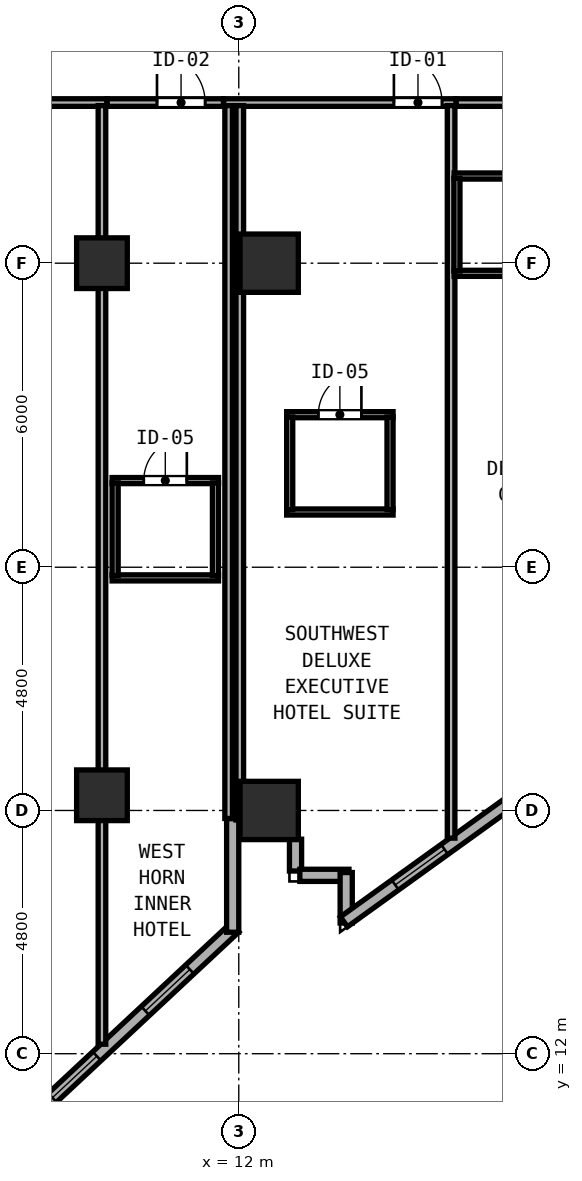
"""IFC4 building model, lengths in metres.
Left out: names, types, materials, properties, quantities, classifications, styles, units other than length and angle.
Written with IfcOpenShell. Run it as: python <this file> out.ifc"""

import sys

from ifc_helpers import new_model, si_unit, direction, frame, frame_2d, origin, origin_2d, place, context, subcontext, project, spatial, rectangle, hollow_rectangle, extrude, element, fill, save


model = new_model("IFC4")
c1 = context("Model", 3, precision=1e-05, world=origin(), true_north=direction((0.0, 1.0)))
c2 = subcontext(c1, "Body", "Model", "MODEL_VIEW")
j1 = project(units=[si_unit("LENGTHUNIT", "METRE"), si_unit("PLANEANGLEUNIT", "RADIAN")], contexts=[c1])
p1 = place(None, origin())
s1 = spatial("IfcSite", under=j1, at=p1, CompositionType="ELEMENT")
p2 = place(p1, origin())
s2 = spatial("IfcBuilding", under=s1, at=p2, CompositionType="ELEMENT")
p3 = place(p2, frame((0.0, 0.0, 85.6)))
s3 = spatial("IfcBuildingStorey", under=s2, at=p3, CompositionType="ELEMENT", Elevation=85.6)
for number, where, z_axis, x_axis in (
    (1, (12.6, 16.8, 0.0), (0.0, 0.0, 1.0), (1.0, 0.0, 0.0)),
    (2, (12.6, 27.6, 0.0), (0.0, 0.0, 1.0), (1.0, 0.0, 0.0)),
):
    element("IfcColumn", number, at=place(p3, frame(where, z_axis=z_axis, x_axis=x_axis)), inside=s3, PredefinedType="COLUMN", context=c2, shape_type="SweptSolid", body=[
        extrude(hollow_rectangle(XDim=1.15, YDim=1.15, WallThickness=0.042, at=origin_2d()), origin(), (0.0, 0.0, 1.0), 3.8),
    ])
for number, where, z_axis, x_axis in (
    (3, (9.3, 17.1, 0.0), (0.0, 0.0, 1.0), (1.0, 0.0, 0.0)),
    (4, (9.3, 27.6, 0.0), (0.0, 0.0, 1.0), (1.0, 0.0, 0.0)),
):
    element("IfcColumn", number, at=place(p3, frame(where, z_axis=z_axis, x_axis=x_axis)), inside=s3, PredefinedType="COLUMN", context=c2, shape_type="SweptSolid", body=[
        extrude(hollow_rectangle(XDim=1.0, YDim=1.0, WallThickness=0.038, at=origin_2d()), origin(), (0.0, 0.0, 1.0), 3.8),
    ])
p4 = place(p3, frame((3.27, 6.416, 0.0), z_axis=(0.0, 0.0, 1.0), x_axis=(0.731064187858, 0.682308693505, 0.0)))
e5 = element("IfcWall", 5, at=p4, inside=s3, PredefinedType="SOLIDWALL", context=c2, shape_type="SweptSolid", body=[
    extrude(rectangle(XDim=11.833, YDim=0.24, at=frame_2d((5.916, 0.0))), origin(), (0.0, 0.0, 1.0), 3.54),
])
p5 = place(p4, frame((1.6, 0.0, 0.85)))
e6 = element("IfcOpeningElement", 6, at=p5, cuts=e5, PredefinedType="OPENING", context=c2, shape_type="SweptSolid", body=[
    extrude(rectangle(XDim=1.2, YDim=1.85, at=frame_2d((0.6, 0.925))), frame((0.0, 0.13, 0.0), z_axis=(0.0, -1.0, 0.0), x_axis=(1.0, 0.0, 0.0)), (0.0, 0.0, 1.0), 0.26),
])
p6 = place(p4, frame((6.912, 0.0, 0.85)))
e7 = element("IfcOpeningElement", 7, at=p6, cuts=e5, PredefinedType="OPENING", context=c2, shape_type="SweptSolid", body=[
    extrude(rectangle(XDim=1.2, YDim=1.85, at=frame_2d((0.6, 0.925))), frame((0.0, 0.13, 0.0), z_axis=(0.0, -1.0, 0.0), x_axis=(1.0, 0.0, 0.0)), (0.0, 0.0, 1.0), 0.26),
])
p7 = place(p4, frame((9.421, 0.0, 0.85)))
e8 = element("IfcOpeningElement", 8, at=p7, cuts=e5, PredefinedType="OPENING", context=c2, shape_type="SweptSolid", body=[
    extrude(rectangle(XDim=1.2, YDim=1.85, at=frame_2d((0.6, 0.925))), frame((0.0, 0.13, 0.0), z_axis=(0.0, -1.0, 0.0), x_axis=(1.0, 0.0, 0.0)), (0.0, 0.0, 1.0), 0.26),
])
p8 = place(p3, frame((11.88, 14.397, 0.0), z_axis=(0.0, 0.0, 1.0), x_axis=(0.0, 1.0, 0.0)))
e9 = element("IfcWall", 9, at=p8, inside=s3, PredefinedType="SOLIDWALL", context=c2, shape_type="SweptSolid", body=[
    extrude(rectangle(XDim=2.243, YDim=0.24, at=frame_2d((1.121, 0.0))), origin(), (0.0, 0.0, 1.0), 3.54),
])
p9 = place(p3, frame((13.12, 16.233, 0.0), z_axis=(0.0, 0.0, 1.0), x_axis=(0.0, -1.0, 0.0)))
e10 = element("IfcWall", 10, at=p9, inside=s3, PredefinedType="SOLIDWALL", context=c2, shape_type="SweptSolid", body=[
    extrude(rectangle(XDim=0.628, YDim=0.24, at=frame_2d((0.314, 0.0))), origin(), (0.0, 0.0, 1.0), 3.54),
])
p10 = place(p3, frame((13.205, 15.52, 0.0), z_axis=(0.0, 0.0, 1.0), x_axis=(1.0, 0.0, 0.0)))
e11 = element("IfcWall", 11, at=p10, inside=s3, PredefinedType="SOLIDWALL", context=c2, shape_type="SweptSolid", body=[
    extrude(rectangle(XDim=0.97, YDim=0.24, at=frame_2d((0.485, 0.0))), origin(), (0.0, 0.0, 1.0), 3.54),
])
p11 = place(p3, frame((14.12, 15.575, 0.0), z_axis=(0.0, 0.0, 1.0), x_axis=(0.0, -1.0, 0.0)))
e12 = element("IfcWall", 12, at=p11, inside=s3, PredefinedType="SOLIDWALL", context=c2, shape_type="SweptSolid", body=[
    extrude(rectangle(XDim=0.996, YDim=0.24, at=frame_2d((0.498, 0.0))), origin(), (0.0, 0.0, 1.0), 3.54),
])
p12 = place(p3, frame((14.075, 14.602, 0.0), z_axis=(0.0, 0.0, 1.0), x_axis=(0.811543176492, 0.58429245476, 0.0)))
e13 = element("IfcWall", 13, at=p12, inside=s3, PredefinedType="SOLIDWALL", context=c2, shape_type="SweptSolid", body=[
    extrude(rectangle(XDim=11.531, YDim=0.24, at=frame_2d((5.765, 0.0))), origin(), (0.0, 0.0, 1.0), 3.037),
])
p13 = place(p12, frame((1.246, 0.0, 0.85)))
e14 = element("IfcOpeningElement", 14, at=p13, cuts=e13, PredefinedType="OPENING", context=c2, shape_type="SweptSolid", body=[
    extrude(rectangle(XDim=1.2, YDim=1.85, at=frame_2d((0.6, 0.925))), frame((0.0, 0.13, 0.0), z_axis=(0.0, -1.0, 0.0), x_axis=(1.0, 0.0, 0.0)), (0.0, 0.0, 1.0), 0.26),
])
p14 = place(p12, frame((6.36, 0.0, 0.85)))
e15 = element("IfcOpeningElement", 15, at=p14, cuts=e13, PredefinedType="OPENING", context=c2, shape_type="SweptSolid", body=[
    extrude(rectangle(XDim=1.2, YDim=1.85, at=frame_2d((0.6, 0.925))), frame((0.0, 0.13, 0.0), z_axis=(0.0, -1.0, 0.0), x_axis=(1.0, 0.0, 0.0)), (0.0, 0.0, 1.0), 0.26),
])
p15 = place(p12, frame((9.07, 0.0, 0.85)))
e16 = element("IfcOpeningElement", 16, at=p15, cuts=e13, PredefinedType="OPENING", context=c2, shape_type="SweptSolid", body=[
    extrude(rectangle(XDim=1.2, YDim=1.85, at=frame_2d((0.6, 0.925))), frame((0.0, 0.13, 0.0), z_axis=(0.0, -1.0, 0.0), x_axis=(1.0, 0.0, 0.0)), (0.0, 0.0, 1.0), 0.26),
])
p16 = place(p3, frame((12.173, 33.524, 0.0), z_axis=(0.0, 0.0, 1.0), x_axis=(-0.963197271032, -0.268795493036, 0.0)))
e17 = element("IfcWall", 17, at=p16, inside=s3, PredefinedType="SOLIDWALL", context=c2, shape_type="SweptSolid", body=[
    extrude(rectangle(XDim=9.095, YDim=0.24, at=frame_2d((4.548, 0.0))), origin(), (0.0, 0.0, 1.0), 3.54),
])
p17 = place(p16, frame((1.6, 0.0, 0.85)))
e18 = element("IfcOpeningElement", 18, at=p17, cuts=e17, PredefinedType="OPENING", context=c2, shape_type="SweptSolid", body=[
    extrude(rectangle(XDim=1.2, YDim=1.85, at=frame_2d((0.6, 0.925))), frame((0.0, 0.13, 0.0), z_axis=(0.0, -1.0, 0.0), x_axis=(1.0, 0.0, 0.0)), (0.0, 0.0, 1.0), 0.26),
])
p18 = place(p16, frame((7.0, 0.0, 0.85)))
e19 = element("IfcOpeningElement", 19, at=p18, cuts=e17, PredefinedType="OPENING", context=c2, shape_type="SweptSolid", body=[
    extrude(rectangle(XDim=1.2, YDim=1.85, at=frame_2d((0.6, 0.925))), frame((0.0, 0.13, 0.0), z_axis=(0.0, -1.0, 0.0), x_axis=(1.0, 0.0, 0.0)), (0.0, 0.0, 1.0), 0.26),
])
p19 = place(p3, frame((11.7, 30.77, 0.0), z_axis=(0.0, 0.0, 1.0), x_axis=(1.0, 0.0, 0.0)))
e20 = element("IfcWall", 20, at=p19, inside=s3, PredefinedType="PARTITIONING", context=c2, shape_type="SweptSolid", body=[
    extrude(rectangle(XDim=4.59, YDim=0.15, at=frame_2d((2.295, 0.0))), origin(), (0.0, 0.0, 1.0), 3.54),
])
p20 = place(p19, frame((4.311, 0.0, 0.0), z_axis=(0.0, 0.0, 1.0), x_axis=(-1.0, 0.0, 0.0)))
e21 = element("IfcOpeningElement", 21, at=p20, cuts=e20, PredefinedType="OPENING", context=c2, shape_type="SweptSolid", body=[
    extrude(rectangle(XDim=0.95, YDim=2.18, at=frame_2d((0.475, 1.09))), frame((0.0, 0.085, 0.0), z_axis=(0.0, -1.0, 0.0), x_axis=(1.0, 0.0, 0.0)), (0.0, 0.0, 1.0), 0.17),
])
p21 = place(p3, frame((11.8, 16.642, 0.0), z_axis=(0.0, 0.0, 1.0), x_axis=(0.0, 1.0, 0.0)))
e22 = element("IfcWall", 22, at=p21, inside=s3, PredefinedType="PARTITIONING", context=c2, shape_type="SweptSolid", body=[
    extrude(rectangle(XDim=14.068, YDim=0.15, at=frame_2d((7.034, 0.0))), origin(), (0.0, 0.0, 1.0), 3.54),
])
p22 = place(p3, frame((16.19, 16.254, 0.0), z_axis=(0.0, 0.0, 1.0), x_axis=(0.0, 1.0, 0.0)))
e23 = element("IfcWall", 23, at=p22, inside=s3, PredefinedType="PARTITIONING", context=c2, shape_type="SweptSolid", body=[
    extrude(rectangle(XDim=14.456, YDim=0.15, at=frame_2d((7.228, 0.0))), origin(), (0.0, 0.0, 1.0), 3.54),
])
p23 = place(p3, frame((12.945, 24.61, 0.0), z_axis=(0.0, 0.0, 1.0), x_axis=(1.0, 0.0, 0.0)))
e24 = element("IfcWall", 24, at=p23, inside=s3, PredefinedType="PARTITIONING", context=c2, shape_type="SweptSolid", body=[
    extrude(rectangle(XDim=2.1, YDim=0.12, at=frame_2d((1.05, 0.0))), origin(), (0.0, 0.0, 1.0), 3.54),
])
p24 = place(p23, frame((1.475, 0.0, 0.0), z_axis=(0.0, 0.0, 1.0), x_axis=(-1.0, 0.0, 0.0)))
e25 = element("IfcOpeningElement", 25, at=p24, cuts=e24, PredefinedType="OPENING", context=c2, shape_type="SweptSolid", body=[
    extrude(rectangle(XDim=0.85, YDim=2.1, at=frame_2d((0.425, 1.05))), frame((0.0, 0.07, 0.0), z_axis=(0.0, -1.0, 0.0), x_axis=(1.0, 0.0, 0.0)), (0.0, 0.0, 1.0), 0.14),
])
p25 = place(p3, frame((12.945, 22.69, 0.0), z_axis=(0.0, 0.0, 1.0), x_axis=(1.0, 0.0, 0.0)))
e26 = element("IfcWall", 26, at=p25, inside=s3, PredefinedType="PARTITIONING", context=c2, shape_type="SweptSolid", body=[
    extrude(rectangle(XDim=2.1, YDim=0.12, at=frame_2d((1.05, 0.0))), origin(), (0.0, 0.0, 1.0), 3.54),
])
for number, where, z_axis, x_axis in (
    (27, (13.005, 22.735, 0.0), (0.0, 0.0, 1.0), (0.0, 1.0, 0.0)),
    (28, (14.985, 22.735, 0.0), (0.0, 0.0, 1.0), (0.0, 1.0, 0.0)),
):
    element("IfcWall", number, at=place(p3, frame(where, z_axis=z_axis, x_axis=x_axis)), inside=s3, PredefinedType="PARTITIONING", context=c2, shape_type="SweptSolid", body=[
        extrude(rectangle(XDim=1.83, YDim=0.12, at=frame_2d((0.915, 0.0))), origin(), (0.0, 0.0, 1.0), 3.54),
    ])
p26 = place(p3, frame((16.292, 30.77, 0.0), z_axis=(0.0, 0.0, 1.0), x_axis=(1.0, 0.0, 0.0)))
e29 = element("IfcWall", 29, at=p26, inside=s3, PredefinedType="PARTITIONING", context=c2, shape_type="SweptSolid", body=[
    extrude(rectangle(XDim=4.148, YDim=0.15, at=frame_2d((2.074, 0.0))), origin(), (0.0, 0.0, 1.0), 3.54),
])
p27 = place(p26, frame((3.885, 0.0, 0.0), z_axis=(0.0, 0.0, 1.0), x_axis=(-1.0, 0.0, 0.0)))
e30 = element("IfcOpeningElement", 30, at=p27, cuts=e29, PredefinedType="OPENING", context=c2, shape_type="SweptSolid", body=[
    extrude(rectangle(XDim=0.95, YDim=2.15, at=frame_2d((0.475, 1.075))), frame((0.0, 0.085, 0.0), z_axis=(0.0, -1.0, 0.0), x_axis=(1.0, 0.0, 0.0)), (0.0, 0.0, 1.0), 0.17),
])
p28 = place(p3, frame((16.25, 29.32, 0.0), z_axis=(0.0, 0.0, 1.0), x_axis=(1.0, 0.0, 0.0)))
e31 = element("IfcWall", 31, at=p28, inside=s3, PredefinedType="PARTITIONING", context=c2, shape_type="SweptSolid", body=[
    extrude(rectangle(XDim=2.095, YDim=0.12, at=frame_2d((1.047, 0.0))), origin(), (0.0, 0.0, 1.0), 3.54),
])
p29 = place(p3, frame((16.25, 27.4, 0.0), z_axis=(0.0, 0.0, 1.0), x_axis=(1.0, 0.0, 0.0)))
e32 = element("IfcWall", 32, at=p29, inside=s3, PredefinedType="PARTITIONING", context=c2, shape_type="SweptSolid", body=[
    extrude(rectangle(XDim=2.095, YDim=0.12, at=frame_2d((1.047, 0.0))), origin(), (0.0, 0.0, 1.0), 3.037),
])
p30 = place(p3, frame((16.305, 27.445, 0.0), z_axis=(0.0, 0.0, 1.0), x_axis=(0.0, 1.0, 0.0)))
e33 = element("IfcWall", 33, at=p30, inside=s3, PredefinedType="PARTITIONING", context=c2, shape_type="SweptSolid", body=[
    extrude(rectangle(XDim=1.83, YDim=0.12, at=frame_2d((0.915, 0.0))), origin(), (0.0, 0.0, 1.0), 3.54),
])
p31 = place(p3, frame((3.311, 30.77, 0.0), z_axis=(0.0, 0.0, 1.0), x_axis=(1.0, 0.0, 0.0)))
e34 = element("IfcWall", 34, at=p31, inside=s3, PredefinedType="PARTITIONING", context=c2, shape_type="SweptSolid", body=[
    extrude(rectangle(XDim=6.089, YDim=0.15, at=frame_2d((3.044, 0.0))), origin(), (0.0, 0.0, 1.0), 3.54),
])
p32 = place(p31, frame((4.801, 0.0, 0.0), z_axis=(0.0, 0.0, 1.0), x_axis=(-1.0, 0.0, 0.0)))
e35 = element("IfcOpeningElement", 35, at=p32, cuts=e34, PredefinedType="OPENING", context=c2, shape_type="SweptSolid", body=[
    extrude(rectangle(XDim=0.95, YDim=2.18, at=frame_2d((0.475, 1.09))), frame((0.0, 0.085, 0.0), z_axis=(0.0, -1.0, 0.0), x_axis=(1.0, 0.0, 0.0)), (0.0, 0.0, 1.0), 0.17),
])
p33 = place(p3, frame((9.3, 12.188, 0.0), z_axis=(0.0, 0.0, 1.0), x_axis=(0.0, 1.0, 0.0)))
e36 = element("IfcWall", 36, at=p33, inside=s3, PredefinedType="PARTITIONING", context=c2, shape_type="SweptSolid", body=[
    extrude(rectangle(XDim=18.522, YDim=0.15, at=frame_2d((9.261, 0.0))), origin(), (0.0, 0.0, 1.0), 3.54),
])
p34 = place(p3, frame((9.402, 30.77, 0.0), z_axis=(0.0, 0.0, 1.0), x_axis=(1.0, 0.0, 0.0)))
e37 = element("IfcWall", 37, at=p34, inside=s3, PredefinedType="PARTITIONING", context=c2, shape_type="SweptSolid", body=[
    extrude(rectangle(XDim=2.296, YDim=0.15, at=frame_2d((1.148, 0.0))), origin(), (0.0, 0.0, 1.0), 3.54),
])
p35 = place(p34, frame((1.934, 0.0, 0.0), z_axis=(0.0, 0.0, 1.0), x_axis=(-1.0, 0.0, 0.0)))
e38 = element("IfcOpeningElement", 38, at=p35, cuts=e37, PredefinedType="OPENING", context=c2, shape_type="SweptSolid", body=[
    extrude(rectangle(XDim=0.95, YDim=2.15, at=frame_2d((0.475, 1.075))), frame((0.0, 0.085, 0.0), z_axis=(0.0, -1.0, 0.0), x_axis=(1.0, 0.0, 0.0)), (0.0, 0.0, 1.0), 0.17),
])
p36 = place(p3, frame((12.02, 16.612, 0.0), z_axis=(0.0, 0.0, 1.0), x_axis=(0.0, 1.0, 0.0)))
e39 = element("IfcWall", 39, at=p36, inside=s3, PredefinedType="PARTITIONING", context=c2, shape_type="SweptSolid", body=[
    extrude(rectangle(XDim=14.098, YDim=0.15, at=frame_2d((7.049, 0.0))), origin(), (0.0, 0.0, 1.0), 3.54),
])
p37 = place(p3, frame((9.5, 23.31, 0.0), z_axis=(0.0, 0.0, 1.0), x_axis=(1.0, 0.0, 0.0)))
e40 = element("IfcWall", 40, at=p37, inside=s3, PredefinedType="PARTITIONING", context=c2, shape_type="SweptSolid", body=[
    extrude(rectangle(XDim=2.1, YDim=0.12, at=frame_2d((1.05, 0.0))), origin(), (0.0, 0.0, 1.0), 3.54),
])
p38 = place(p37, frame((1.475, 0.0, 0.0), z_axis=(0.0, 0.0, 1.0), x_axis=(-1.0, 0.0, 0.0)))
e41 = element("IfcOpeningElement", 41, at=p38, cuts=e40, PredefinedType="OPENING", context=c2, shape_type="SweptSolid", body=[
    extrude(rectangle(XDim=0.85, YDim=2.1, at=frame_2d((0.425, 1.05))), frame((0.0, 0.07, 0.0), z_axis=(0.0, -1.0, 0.0), x_axis=(1.0, 0.0, 0.0)), (0.0, 0.0, 1.0), 0.14),
])
p39 = place(p3, frame((9.5, 21.39, 0.0), z_axis=(0.0, 0.0, 1.0), x_axis=(1.0, 0.0, 0.0)))
e42 = element("IfcWall", 42, at=p39, inside=s3, PredefinedType="PARTITIONING", context=c2, shape_type="SweptSolid", body=[
    extrude(rectangle(XDim=2.1, YDim=0.12, at=frame_2d((1.05, 0.0))), origin(), (0.0, 0.0, 1.0), 3.54),
])
for number, where, z_axis, x_axis in (
    (43, (9.56, 21.435, 0.0), (0.0, 0.0, 1.0), (0.0, 1.0, 0.0)),
    (44, (11.54, 21.435, 0.0), (0.0, 0.0, 1.0), (0.0, 1.0, 0.0)),
):
    element("IfcWall", number, at=place(p3, frame(where, z_axis=z_axis, x_axis=x_axis)), inside=s3, PredefinedType="PARTITIONING", context=c2, shape_type="SweptSolid", body=[
        extrude(rectangle(XDim=1.83, YDim=0.12, at=frame_2d((0.915, 0.0))), origin(), (0.0, 0.0, 1.0), 3.54),
    ])
p40 = place(p6, origin())
e45 = element("IfcWindow", 45, at=p40, inside=s3, PartitioningType="SINGLE_PANEL", PredefinedType="WINDOW", context=c2, shape_type="SweptSolid", body=[
    extrude(rectangle(XDim=1.2, YDim=1.85, at=frame_2d((0.6, 0.925))), frame((0.0, 0.03, 0.0), z_axis=(0.0, -1.0, 0.0), x_axis=(1.0, 0.0, 0.0)), (0.0, 0.0, 1.0), 0.06),
])
fill(e7, e45)
p41 = place(p13, origin())
e46 = element("IfcWindow", 46, at=p41, inside=s3, PartitioningType="SINGLE_PANEL", PredefinedType="WINDOW", context=c2, shape_type="SweptSolid", body=[
    extrude(rectangle(XDim=1.2, YDim=1.85, at=frame_2d((0.6, 0.925))), frame((0.0, 0.03, 0.0), z_axis=(0.0, -1.0, 0.0), x_axis=(1.0, 0.0, 0.0)), (0.0, 0.0, 1.0), 0.06),
])
fill(e14, e46)
p42 = place(p20, origin())
e47 = element("IfcDoor", 47, at=p42, inside=s3, OperationType="SINGLE_SWING_RIGHT", PredefinedType="DOOR", context=c2, shape_type="SweptSolid", body=[
    extrude(rectangle(XDim=0.95, YDim=2.18, at=frame_2d((0.475, 1.09))), frame((0.0, 0.025, 0.0), z_axis=(0.0, -1.0, 0.0), x_axis=(1.0, 0.0, 0.0)), (0.0, 0.0, 1.0), 0.05),
])
fill(e21, e47)
p43 = place(p24, origin())
e48 = element("IfcDoor", 48, at=p43, inside=s3, OperationType="SINGLE_SWING_LEFT", PredefinedType="DOOR", context=c2, shape_type="SweptSolid", body=[
    extrude(rectangle(XDim=0.85, YDim=2.1, at=frame_2d((0.425, 1.05))), frame((0.0, 0.025, 0.0), z_axis=(0.0, -1.0, 0.0), x_axis=(1.0, 0.0, 0.0)), (0.0, 0.0, 1.0), 0.05),
])
fill(e25, e48)
p44 = place(p35, origin())
e49 = element("IfcDoor", 49, at=p44, inside=s3, OperationType="SINGLE_SWING_RIGHT", PredefinedType="DOOR", context=c2, shape_type="SweptSolid", body=[
    extrude(rectangle(XDim=0.95, YDim=2.15, at=frame_2d((0.475, 1.075))), frame((0.0, 0.025, 0.0), z_axis=(0.0, -1.0, 0.0), x_axis=(1.0, 0.0, 0.0)), (0.0, 0.0, 1.0), 0.05),
])
fill(e38, e49)
p45 = place(p38, origin())
e50 = element("IfcDoor", 50, at=p45, inside=s3, OperationType="SINGLE_SWING_LEFT", PredefinedType="DOOR", context=c2, shape_type="SweptSolid", body=[
    extrude(rectangle(XDim=0.85, YDim=2.1, at=frame_2d((0.425, 1.05))), frame((0.0, 0.025, 0.0), z_axis=(0.0, -1.0, 0.0), x_axis=(1.0, 0.0, 0.0)), (0.0, 0.0, 1.0), 0.05),
])
fill(e41, e50)
p46 = place(p7, origin())
e51 = element("IfcWindow", 51, at=p46, inside=s3, PartitioningType="SINGLE_PANEL", PredefinedType="WINDOW", context=c2, shape_type="SweptSolid", body=[
    extrude(rectangle(XDim=1.2, YDim=1.85, at=frame_2d((0.6, 0.925))), frame((0.0, 0.03, 0.0), z_axis=(0.0, -1.0, 0.0), x_axis=(1.0, 0.0, 0.0)), (0.0, 0.0, 1.0), 0.06),
])
fill(e8, e51)
save(model, sys.argv[1])
